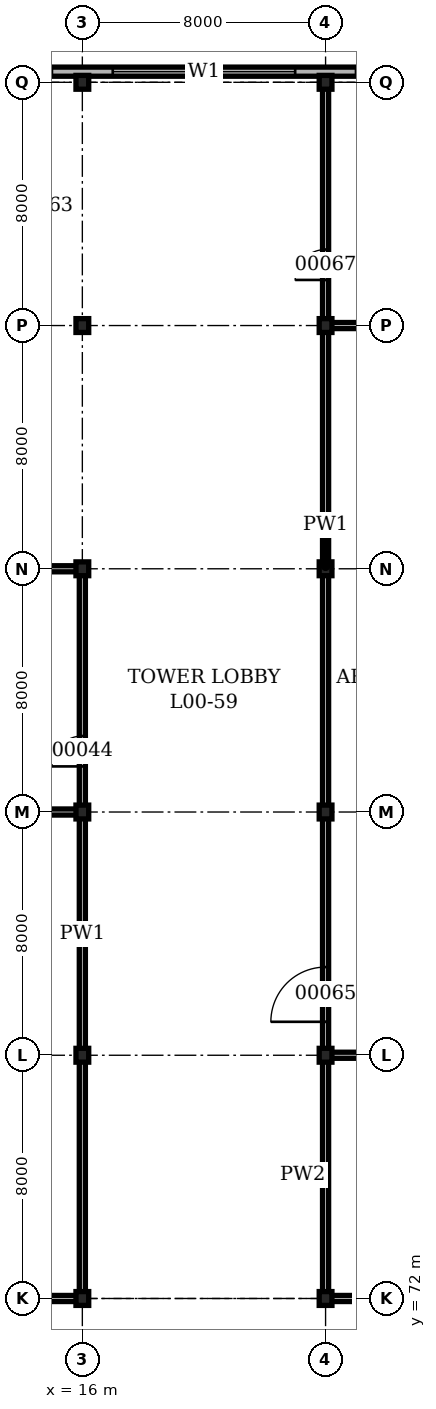
"""IFC4 building model, lengths in metres.
Left out: names, types, materials, properties, quantities, classifications, styles, units other than length and angle.
Written with IfcOpenShell. Run it as: python <this file> out.ifc"""

import sys

from ifc_helpers import new_model, si_unit, direction, frame, frame_2d, origin, origin_2d, place, context, subcontext, project, spatial, rectangle, i_section, extrude, element, fill, save


model = new_model("IFC4")
c1 = context("Model", 3, precision=1e-05, world=origin(), true_north=direction((0.0, 1.0)))
c2 = subcontext(c1, "Body", "Model", "MODEL_VIEW")
j1 = project(units=[si_unit("LENGTHUNIT", "METRE"), si_unit("PLANEANGLEUNIT", "RADIAN")], contexts=[c1])
p1 = place(None, origin())
s1 = spatial("IfcSite", under=j1, at=p1, CompositionType="ELEMENT")
p2 = place(p1, origin())
s2 = spatial("IfcBuilding", under=s1, at=p2, CompositionType="ELEMENT")
p3 = place(p2, origin())
s3 = spatial("IfcBuildingStorey", under=s2, at=p3, CompositionType="ELEMENT", Elevation=0.0)
for number, where, z_axis, x_axis in (
    (1, (16.0, 72.0, 0.0), (0.0, 0.0, 1.0), (1.0, 0.0, 0.0)),
    (2, (16.0, 80.0, 0.0), (0.0, 0.0, 1.0), (1.0, 0.0, 0.0)),
    (3, (16.0, 88.0, 0.0), (0.0, 0.0, 1.0), (1.0, 0.0, 0.0)),
    (4, (16.0, 96.0, 0.0), (0.0, 0.0, 1.0), (1.0, 0.0, 0.0)),
    (5, (16.0, 104.0, 0.0), (0.0, 0.0, 1.0), (1.0, 0.0, 0.0)),
    (6, (16.0, 112.0, 0.0), (0.0, 0.0, 1.0), (1.0, 0.0, 0.0)),
    (7, (24.0, 72.0, 0.0), (0.0, 0.0, 1.0), (1.0, 0.0, 0.0)),
    (8, (24.0, 80.0, 0.0), (0.0, 0.0, 1.0), (1.0, 0.0, 0.0)),
    (9, (24.0, 88.0, 0.0), (0.0, 0.0, 1.0), (1.0, 0.0, 0.0)),
    (10, (24.0, 96.0, 0.0), (0.0, 0.0, 1.0), (1.0, 0.0, 0.0)),
    (11, (24.0, 104.0, 0.0), (0.0, 0.0, 1.0), (1.0, 0.0, 0.0)),
    (12, (24.0, 112.0, 0.0), (0.0, 0.0, 1.0), (1.0, 0.0, 0.0)),
):
    element("IfcColumn", number, at=place(p3, frame(where, z_axis=z_axis, x_axis=x_axis)), inside=s3, PredefinedType="COLUMN", context=c2, shape_type="SweptSolid", body=[
        extrude(i_section(OverallWidth=0.419, OverallDepth=0.455, WebThickness=0.042, FlangeThickness=0.068, at=origin_2d()), origin(), (0.0, 0.0, 1.0), 4.9),
    ])
p4 = place(p3, frame((112.35, 112.35, 0.0), z_axis=(0.0, 0.0, 1.0), x_axis=(-1.0, 0.0, 0.0)))
e13 = element("IfcWall", 13, at=p4, inside=s3, PredefinedType="SOLIDWALL", context=c2, shape_type="SweptSolid", body=[
    extrude(rectangle(XDim=112.7, YDim=0.3, at=frame_2d((56.35, 0.0))), origin(), (0.0, 0.0, 1.0), 4.9),
])
p5 = place(p4, frame((1.35, 0.0, 1.2)))
e14 = element("IfcOpeningElement", 14, at=p5, cuts=e13, PredefinedType="OPENING", context=c2, shape_type="SweptSolid", body=[
    extrude(rectangle(XDim=6.0, YDim=1.5, at=frame_2d((3.0, 0.75))), frame((0.0, 0.16, 0.0), z_axis=(0.0, -1.0, 0.0), x_axis=(1.0, 0.0, 0.0)), (0.0, 0.0, 1.0), 0.32),
])
p6 = place(p4, frame((9.35, 0.0, 1.2)))
e15 = element("IfcOpeningElement", 15, at=p6, cuts=e13, PredefinedType="OPENING", context=c2, shape_type="SweptSolid", body=[
    extrude(rectangle(XDim=6.0, YDim=1.5, at=frame_2d((3.0, 0.75))), frame((0.0, 0.16, 0.0), z_axis=(0.0, -1.0, 0.0), x_axis=(1.0, 0.0, 0.0)), (0.0, 0.0, 1.0), 0.32),
])
p7 = place(p4, frame((17.35, 0.0, 1.2)))
e16 = element("IfcOpeningElement", 16, at=p7, cuts=e13, PredefinedType="OPENING", context=c2, shape_type="SweptSolid", body=[
    extrude(rectangle(XDim=6.0, YDim=1.5, at=frame_2d((3.0, 0.75))), frame((0.0, 0.16, 0.0), z_axis=(0.0, -1.0, 0.0), x_axis=(1.0, 0.0, 0.0)), (0.0, 0.0, 1.0), 0.32),
])
p8 = place(p4, frame((25.35, 0.0, 1.2)))
e17 = element("IfcOpeningElement", 17, at=p8, cuts=e13, PredefinedType="OPENING", context=c2, shape_type="SweptSolid", body=[
    extrude(rectangle(XDim=6.0, YDim=1.5, at=frame_2d((3.0, 0.75))), frame((0.0, 0.16, 0.0), z_axis=(0.0, -1.0, 0.0), x_axis=(1.0, 0.0, 0.0)), (0.0, 0.0, 1.0), 0.32),
])
p9 = place(p4, frame((33.35, 0.0, 1.2)))
e18 = element("IfcOpeningElement", 18, at=p9, cuts=e13, PredefinedType="OPENING", context=c2, shape_type="SweptSolid", body=[
    extrude(rectangle(XDim=6.0, YDim=1.5, at=frame_2d((3.0, 0.75))), frame((0.0, 0.16, 0.0), z_axis=(0.0, -1.0, 0.0), x_axis=(1.0, 0.0, 0.0)), (0.0, 0.0, 1.0), 0.32),
])
p10 = place(p4, frame((41.35, 0.0, 1.2)))
e19 = element("IfcOpeningElement", 19, at=p10, cuts=e13, PredefinedType="OPENING", context=c2, shape_type="SweptSolid", body=[
    extrude(rectangle(XDim=6.0, YDim=1.5, at=frame_2d((3.0, 0.75))), frame((0.0, 0.16, 0.0), z_axis=(0.0, -1.0, 0.0), x_axis=(1.0, 0.0, 0.0)), (0.0, 0.0, 1.0), 0.32),
])
p11 = place(p4, frame((49.35, 0.0, 1.2)))
e20 = element("IfcOpeningElement", 20, at=p11, cuts=e13, PredefinedType="OPENING", context=c2, shape_type="SweptSolid", body=[
    extrude(rectangle(XDim=6.0, YDim=1.5, at=frame_2d((3.0, 0.75))), frame((0.0, 0.16, 0.0), z_axis=(0.0, -1.0, 0.0), x_axis=(1.0, 0.0, 0.0)), (0.0, 0.0, 1.0), 0.32),
])
p12 = place(p4, frame((57.35, 0.0, 1.2)))
e21 = element("IfcOpeningElement", 21, at=p12, cuts=e13, PredefinedType="OPENING", context=c2, shape_type="SweptSolid", body=[
    extrude(rectangle(XDim=6.0, YDim=1.5, at=frame_2d((3.0, 0.75))), frame((0.0, 0.16, 0.0), z_axis=(0.0, -1.0, 0.0), x_axis=(1.0, 0.0, 0.0)), (0.0, 0.0, 1.0), 0.32),
])
p13 = place(p4, frame((65.35, 0.0, 1.2)))
e22 = element("IfcOpeningElement", 22, at=p13, cuts=e13, PredefinedType="OPENING", context=c2, shape_type="SweptSolid", body=[
    extrude(rectangle(XDim=6.0, YDim=1.5, at=frame_2d((3.0, 0.75))), frame((0.0, 0.16, 0.0), z_axis=(0.0, -1.0, 0.0), x_axis=(1.0, 0.0, 0.0)), (0.0, 0.0, 1.0), 0.32),
])
p14 = place(p4, frame((73.35, 0.0, 1.2)))
e23 = element("IfcOpeningElement", 23, at=p14, cuts=e13, PredefinedType="OPENING", context=c2, shape_type="SweptSolid", body=[
    extrude(rectangle(XDim=6.0, YDim=1.5, at=frame_2d((3.0, 0.75))), frame((0.0, 0.16, 0.0), z_axis=(0.0, -1.0, 0.0), x_axis=(1.0, 0.0, 0.0)), (0.0, 0.0, 1.0), 0.32),
])
p15 = place(p4, frame((81.35, 0.0, 1.2)))
e24 = element("IfcOpeningElement", 24, at=p15, cuts=e13, PredefinedType="OPENING", context=c2, shape_type="SweptSolid", body=[
    extrude(rectangle(XDim=6.0, YDim=1.5, at=frame_2d((3.0, 0.75))), frame((0.0, 0.16, 0.0), z_axis=(0.0, -1.0, 0.0), x_axis=(1.0, 0.0, 0.0)), (0.0, 0.0, 1.0), 0.32),
])
p16 = place(p4, frame((89.35, 0.0, 1.2)))
e25 = element("IfcOpeningElement", 25, at=p16, cuts=e13, PredefinedType="OPENING", context=c2, shape_type="SweptSolid", body=[
    extrude(rectangle(XDim=6.0, YDim=1.5, at=frame_2d((3.0, 0.75))), frame((0.0, 0.16, 0.0), z_axis=(0.0, -1.0, 0.0), x_axis=(1.0, 0.0, 0.0)), (0.0, 0.0, 1.0), 0.32),
])
p17 = place(p4, frame((97.35, 0.0, 1.2)))
e26 = element("IfcOpeningElement", 26, at=p17, cuts=e13, PredefinedType="OPENING", context=c2, shape_type="SweptSolid", body=[
    extrude(rectangle(XDim=6.0, YDim=1.5, at=frame_2d((3.0, 0.75))), frame((0.0, 0.16, 0.0), z_axis=(0.0, -1.0, 0.0), x_axis=(1.0, 0.0, 0.0)), (0.0, 0.0, 1.0), 0.32),
])
p18 = place(p4, frame((105.35, 0.0, 1.2)))
e27 = element("IfcOpeningElement", 27, at=p18, cuts=e13, PredefinedType="OPENING", context=c2, shape_type="SweptSolid", body=[
    extrude(rectangle(XDim=6.0, YDim=1.5, at=frame_2d((3.0, 0.75))), frame((0.0, 0.16, 0.0), z_axis=(0.0, -1.0, 0.0), x_axis=(1.0, 0.0, 0.0)), (0.0, 0.0, 1.0), 0.32),
])
p19 = place(p3, frame((-0.15, 72.0, 0.0), z_axis=(0.0, 0.0, 1.0), x_axis=(1.0, 0.0, 0.0)))
e28 = element("IfcWall", 28, at=p19, inside=s3, PredefinedType="PARTITIONING", context=c2, shape_type="SweptSolid", body=[
    extrude(rectangle(XDim=16.05, YDim=0.2, at=frame_2d((8.025, 0.0))), origin(), (0.0, 0.0, 1.0), 3.928),
])
p20 = place(p19, frame((1.65, 0.0, 0.0)))
e29 = element("IfcOpeningElement", 29, at=p20, cuts=e28, PredefinedType="OPENING", context=c2, shape_type="SweptSolid", body=[
    extrude(rectangle(XDim=1.0, YDim=2.1, at=frame_2d((0.5, 1.05))), frame((0.0, 0.11, 0.0), z_axis=(0.0, -1.0, 0.0), x_axis=(1.0, 0.0, 0.0)), (0.0, 0.0, 1.0), 0.22),
])
p21 = place(p3, frame((24.1, 72.0, 0.0), z_axis=(0.0, 0.0, 1.0), x_axis=(1.0, 0.0, 0.0)))
e30 = element("IfcWall", 30, at=p21, inside=s3, PredefinedType="PARTITIONING", context=c2, shape_type="SweptSolid", body=[
    extrude(rectangle(XDim=7.9, YDim=0.2, at=frame_2d((3.95, 0.0))), origin(), (0.0, 0.0, 1.0), 3.928),
])
p22 = place(p21, frame((1.3, 0.0, 0.0)))
e31 = element("IfcOpeningElement", 31, at=p22, cuts=e30, PredefinedType="OPENING", context=c2, shape_type="SweptSolid", body=[
    extrude(rectangle(XDim=1.2, YDim=2.1, at=frame_2d((0.6, 1.05))), frame((0.0, 0.11, 0.0), z_axis=(0.0, -1.0, 0.0), x_axis=(1.0, 0.0, 0.0)), (0.0, 0.0, 1.0), 0.22),
])
p23 = place(p3, frame((24.1, 80.0, 0.0), z_axis=(0.0, 0.0, 1.0), x_axis=(1.0, 0.0, 0.0)))
e32 = element("IfcWall", 32, at=p23, inside=s3, PredefinedType="PARTITIONING", context=c2, shape_type="SweptSolid", body=[
    extrude(rectangle(XDim=7.9, YDim=0.2, at=frame_2d((3.95, 0.0))), origin(), (0.0, 0.0, 1.0), 3.928),
])
p24 = place(p3, frame((-0.15, 88.0, 0.0), z_axis=(0.0, 0.0, 1.0), x_axis=(1.0, 0.0, 0.0)))
e33 = element("IfcWall", 33, at=p24, inside=s3, PredefinedType="PARTITIONING", context=c2, shape_type="SweptSolid", body=[
    extrude(rectangle(XDim=16.05, YDim=0.2, at=frame_2d((8.025, 0.0))), origin(), (0.0, 0.0, 1.0), 3.928),
])
p25 = place(p3, frame((10.95, 96.0, 0.0), z_axis=(0.0, 0.0, 1.0), x_axis=(1.0, 0.0, 0.0)))
e34 = element("IfcWall", 34, at=p25, inside=s3, PredefinedType="PARTITIONING", context=c2, shape_type="SweptSolid", body=[
    extrude(rectangle(XDim=4.95, YDim=0.2, at=frame_2d((2.475, 0.0))), origin(), (0.0, 0.0, 1.0), 3.928),
])
p26 = place(p3, frame((24.1, 104.0, 0.0), z_axis=(0.0, 0.0, 1.0), x_axis=(1.0, 0.0, 0.0)))
e35 = element("IfcWall", 35, at=p26, inside=s3, PredefinedType="PARTITIONING", context=c2, shape_type="SweptSolid", body=[
    extrude(rectangle(XDim=47.8, YDim=0.2, at=frame_2d((23.9, 0.0))), origin(), (0.0, 0.0, 1.0), 3.928),
])
p27 = place(p26, frame((18.0, 0.0, 0.0)))
e36 = element("IfcOpeningElement", 36, at=p27, cuts=e35, PredefinedType="OPENING", context=c2, shape_type="SweptSolid", body=[
    extrude(rectangle(XDim=1.8, YDim=2.4, at=frame_2d((0.9, 1.2))), frame((0.0, 0.11, 0.0), z_axis=(0.0, -1.0, 0.0), x_axis=(1.0, 0.0, 0.0)), (0.0, 0.0, 1.0), 0.22),
])
p28 = place(p26, frame((34.15, 0.0, 0.0)))
e37 = element("IfcOpeningElement", 37, at=p28, cuts=e35, PredefinedType="OPENING", context=c2, shape_type="SweptSolid", body=[
    extrude(rectangle(XDim=1.0, YDim=2.1, at=frame_2d((0.5, 1.05))), frame((0.0, 0.11, 0.0), z_axis=(0.0, -1.0, 0.0), x_axis=(1.0, 0.0, 0.0)), (0.0, 0.0, 1.0), 0.22),
])
p29 = place(p3, frame((16.0, 72.1, 0.0), z_axis=(0.0, 0.0, 1.0), x_axis=(0.0, 1.0, 0.0)))
e38 = element("IfcWall", 38, at=p29, inside=s3, PredefinedType="PARTITIONING", context=c2, shape_type="SweptSolid", body=[
    extrude(rectangle(XDim=23.8, YDim=0.2, at=frame_2d((11.9, 0.0))), origin(), (0.0, 0.0, 1.0), 3.928),
])
p30 = place(p29, frame((17.4, 0.0, 0.0)))
e39 = element("IfcOpeningElement", 39, at=p30, cuts=e38, PredefinedType="OPENING", context=c2, shape_type="SweptSolid", body=[
    extrude(rectangle(XDim=1.0, YDim=2.1, at=frame_2d((0.5, 1.05))), frame((0.0, 0.11, 0.0), z_axis=(0.0, -1.0, 0.0), x_axis=(1.0, 0.0, 0.0)), (0.0, 0.0, 1.0), 0.22),
])
p31 = place(p3, frame((24.0, 72.1, 0.0), z_axis=(0.0, 0.0, 1.0), x_axis=(0.0, 1.0, 0.0)))
e40 = element("IfcWall", 40, at=p31, inside=s3, PredefinedType="PARTITIONING", context=c2, shape_type="SweptSolid", body=[
    extrude(rectangle(XDim=7.9, YDim=0.2, at=frame_2d((3.95, 0.0))), origin(), (0.0, 0.0, 1.0), 3.928),
])
p32 = place(p3, frame((24.0, 80.0, 0.0), z_axis=(0.0, 0.0, 1.0), x_axis=(0.0, 1.0, 0.0)))
e41 = element("IfcWall", 41, at=p32, inside=s3, PredefinedType="PARTITIONING", context=c2, shape_type="SweptSolid", body=[
    extrude(rectangle(XDim=32.15, YDim=0.2, at=frame_2d((16.075, 0.0))), origin(), (0.0, 0.0, 1.0), 3.928),
])
p33 = place(p32, frame((1.1, 0.0, 0.0)))
e42 = element("IfcOpeningElement", 42, at=p33, cuts=e41, PredefinedType="OPENING", context=c2, shape_type="SweptSolid", body=[
    extrude(rectangle(XDim=1.8, YDim=2.4, at=frame_2d((0.9, 1.2))), frame((0.0, 0.11, 0.0), z_axis=(0.0, -1.0, 0.0), x_axis=(1.0, 0.0, 0.0)), (0.0, 0.0, 1.0), 0.22),
])
p34 = place(p32, frame((25.5, 0.0, 0.0)))
e43 = element("IfcOpeningElement", 43, at=p34, cuts=e41, PredefinedType="OPENING", context=c2, shape_type="SweptSolid", body=[
    extrude(rectangle(XDim=1.0, YDim=2.1, at=frame_2d((0.5, 1.05))), frame((0.0, 0.11, 0.0), z_axis=(0.0, -1.0, 0.0), x_axis=(1.0, 0.0, 0.0)), (0.0, 0.0, 1.0), 0.22),
])
p35 = place(p16, origin())
e44 = element("IfcWindow", 44, at=p35, inside=s3, PartitioningType="SINGLE_PANEL", PredefinedType="WINDOW", context=c2, shape_type="SweptSolid", body=[
    extrude(rectangle(XDim=6.0, YDim=1.5, at=frame_2d((3.0, 0.75))), frame((0.0, 0.03, 0.0), z_axis=(0.0, -1.0, 0.0), x_axis=(1.0, 0.0, 0.0)), (0.0, 0.0, 1.0), 0.06),
])
fill(e25, e44)
p36 = place(p30, origin())
e45 = element("IfcDoor", 45, at=p36, inside=s3, OperationType="SINGLE_SWING_LEFT", PredefinedType="DOOR", context=c2, shape_type="SweptSolid", body=[
    extrude(rectangle(XDim=1.0, YDim=2.1, at=frame_2d((0.5, 1.05))), frame((0.0, 0.1, 0.0), z_axis=(0.0, -1.0, 0.0), x_axis=(1.0, 0.0, 0.0)), (0.0, 0.0, 1.0), 0.199),
])
fill(e39, e45)
p37 = place(p33, origin())
e46 = element("IfcDoor", 46, at=p37, inside=s3, OperationType="DOUBLE_DOOR_DOUBLE_SWING", PredefinedType="DOOR", context=c2, shape_type="SweptSolid", body=[
    extrude(rectangle(XDim=1.8, YDim=2.4, at=frame_2d((0.9, 1.2))), frame((0.0, 0.1, 0.0), z_axis=(0.0, -1.0, 0.0), x_axis=(1.0, 0.0, 0.0)), (0.0, 0.0, 1.0), 0.199),
])
fill(e42, e46)
p38 = place(p34, origin())
e47 = element("IfcDoor", 47, at=p38, inside=s3, OperationType="SINGLE_SWING_LEFT", PredefinedType="DOOR", context=c2, shape_type="SweptSolid", body=[
    extrude(rectangle(XDim=1.0, YDim=2.1, at=frame_2d((0.5, 1.05))), frame((0.0, 0.1, 0.0), z_axis=(0.0, -1.0, 0.0), x_axis=(1.0, 0.0, 0.0)), (0.0, 0.0, 1.0), 0.199),
])
fill(e43, e47)
save(model, sys.argv[1])
